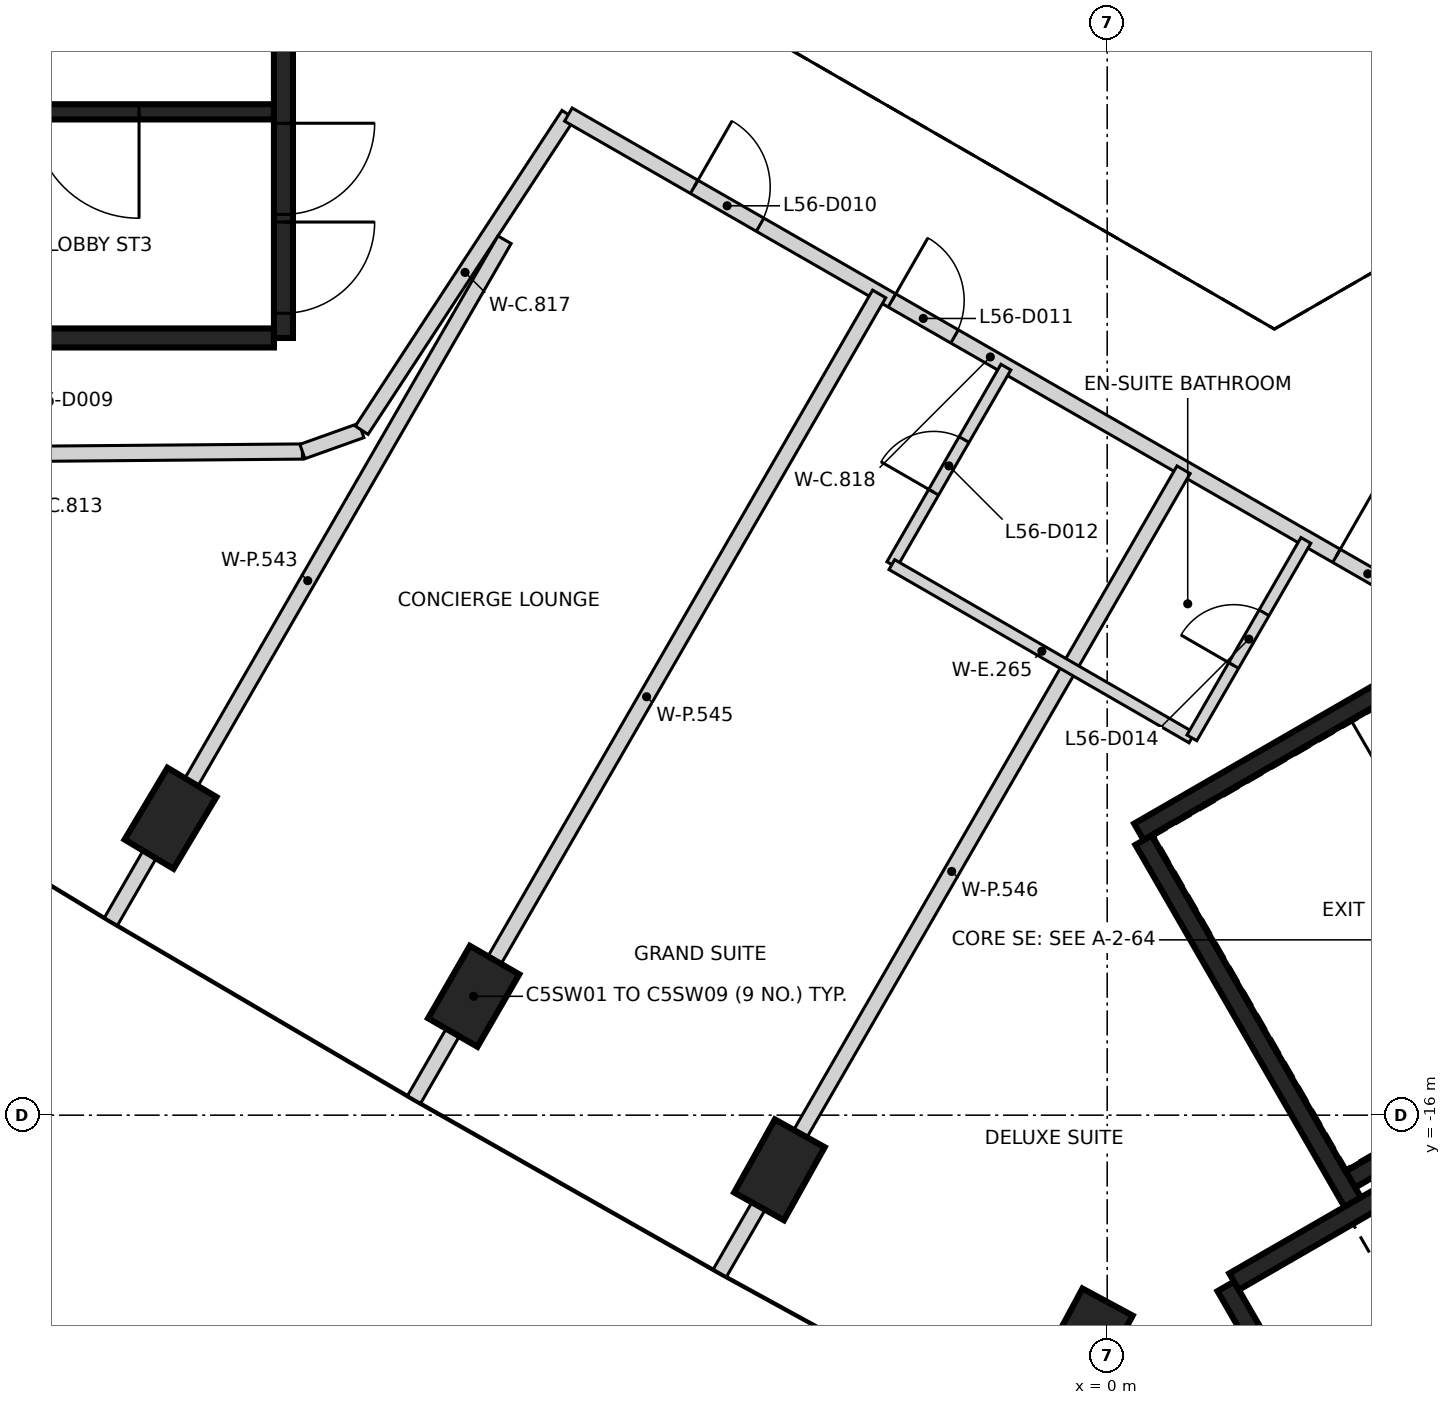
"""IFC4 building model, lengths in metres.
Left out: names, types, materials, properties, quantities, classifications, styles, units other than length and angle.
Written with IfcOpenShell. Run it as: python <this file> out.ifc"""

import sys

from ifc_helpers import new_model, si_unit, direction, frame, frame_2d, origin, origin_2d, place, context, subcontext, project, spatial, rectangle, extrude, element, fill, save


model = new_model("IFC4")
c1 = context("Model", 3, precision=1e-05, world=origin(), true_north=direction((0.0, 1.0)))
c2 = subcontext(c1, "Body", "Model", "MODEL_VIEW")
j1 = project(units=[si_unit("LENGTHUNIT", "METRE"), si_unit("PLANEANGLEUNIT", "RADIAN")], contexts=[c1])
p1 = place(None, origin())
s1 = spatial("IfcSite", under=j1, at=p1, CompositionType="ELEMENT")
p2 = place(p1, origin())
s2 = spatial("IfcBuilding", under=s1, at=p2, CompositionType="ELEMENT")
p3 = place(p2, frame((0.0, 0.0, 225.0)))
s3 = spatial("IfcBuildingStorey", under=s2, at=p3, CompositionType="ELEMENT", Elevation=225.0)
for number, where, z_axis, x_axis in (
    (1, (-12.323, -12.094, -0.35), (0.0, 0.0, 1.0), (0.513, 0.858, 0.0)),
    (2, (-8.335, -14.436, -0.35), (0.0, 0.0, 1.0), (0.5, 0.866, 0.0)),
    (3, (-4.312, -16.719, -0.35), (0.0, 0.0, 1.0), (0.487, 0.873, 0.0)),
    (4, (-0.256, -18.943, -0.35), (0.0, 0.0, 1.0), (0.475, 0.88, 0.0)),
):
    element("IfcColumn", number, at=place(p3, frame(where, z_axis=z_axis, x_axis=x_axis)), inside=s3, PredefinedType="COLUMN", context=c2, shape_type="SweptSolid", body=[
        extrude(rectangle(XDim=1.1, YDim=0.75, at=origin_2d()), origin(), (0.0, 0.0, 1.0), 3.6),
    ])
p4 = place(p3, frame((-10.837, 5.775, 0.0), z_axis=(0.0, 0.0, 1.0), x_axis=(0.0, -1.0, 0.0)))
e5 = element("IfcWall", 5, at=p4, inside=s3, PredefinedType="SHEAR", context=c2, shape_type="SweptSolid", body=[
    extrude(rectangle(XDim=11.55, YDim=0.25, at=frame_2d((5.775, 0.0))), origin(), (0.0, 0.0, 1.0), 3.25),
])
p5 = place(p4, frame((10.025, 0.0, 0.0)))
e6 = element("IfcOpeningElement", 6, at=p5, cuts=e5, PredefinedType="OPENING", context=c2, shape_type="SweptSolid", body=[
    extrude(rectangle(XDim=1.2, YDim=2.1, at=frame_2d((0.6, 1.05))), frame((0.0, 0.135, 0.0), z_axis=(0.0, -1.0, 0.0), x_axis=(1.0, 0.0, 0.0)), (0.0, 0.0, 1.0), 0.27),
])
p6 = place(p4, frame((8.725, 0.0, 0.0)))
e7 = element("IfcOpeningElement", 7, at=p6, cuts=e5, PredefinedType="OPENING", context=c2, shape_type="SweptSolid", body=[
    extrude(rectangle(XDim=1.2, YDim=2.1, at=frame_2d((0.6, 1.05))), frame((0.0, 0.135, 0.0), z_axis=(0.0, -1.0, 0.0), x_axis=(1.0, 0.0, 0.0)), (0.0, 0.0, 1.0), 0.27),
])
p7 = place(p3, frame((-10.963, -5.775, 0.0), z_axis=(0.0, 0.0, 1.0), x_axis=(-1.0, 0.0, 0.0)))
e8 = element("IfcWall", 8, at=p7, inside=s3, PredefinedType="SHEAR", context=c2, shape_type="SweptSolid", body=[
    extrude(rectangle(XDim=5.225, YDim=0.25, at=frame_2d((2.612, 0.0))), origin(), (0.0, 0.0, 1.0), 3.25),
])
p8 = place(p3, frame((-10.963, -2.8, 0.0), z_axis=(0.0, 0.0, 1.0), x_axis=(-1.0, 0.0, 0.0)))
e9 = element("IfcWall", 9, at=p8, inside=s3, PredefinedType="SHEAR", context=c2, shape_type="SweptSolid", body=[
    extrude(rectangle(XDim=5.098, YDim=0.2, at=frame_2d((2.549, 0.0))), origin(), (0.0, 0.0, 1.0), 3.25),
])
p9 = place(p8, frame((1.774, 0.0, 0.0)))
e10 = element("IfcOpeningElement", 10, at=p9, cuts=e9, PredefinedType="OPENING", context=c2, shape_type="SweptSolid", body=[
    extrude(rectangle(XDim=1.4, YDim=2.1, at=frame_2d((0.7, 1.05))), frame((0.0, 0.11, 0.0), z_axis=(0.0, -1.0, 0.0), x_axis=(1.0, 0.0, 0.0)), (0.0, 0.0, 1.0), 0.22),
])
p10 = place(p3, frame((0.417, -12.273, 0.0), z_axis=(0.0, 0.0, 1.0), x_axis=(0.866021906294, 0.500006057782, 0.0)))
e11 = element("IfcWall", 11, at=p10, inside=s3, PredefinedType="SHEAR", context=c2, shape_type="SweptSolid", body=[
    extrude(rectangle(XDim=11.55, YDim=0.25, at=frame_2d((5.775, 0.0))), origin(), (0.0, 0.0, 1.0), 3.25),
])
p11 = place(p10, frame((10.025, 0.0, 0.0)))
e12 = element("IfcOpeningElement", 12, at=p11, cuts=e11, PredefinedType="OPENING", context=c2, shape_type="SweptSolid", body=[
    extrude(rectangle(XDim=1.2, YDim=2.1, at=frame_2d((0.6, 1.05))), frame((0.0, 0.135, 0.0), z_axis=(0.0, -1.0, 0.0), x_axis=(1.0, 0.0, 0.0)), (0.0, 0.0, 1.0), 0.27),
])
p12 = place(p10, frame((8.725, 0.0, 0.0)))
e13 = element("IfcOpeningElement", 13, at=p12, cuts=e11, PredefinedType="OPENING", context=c2, shape_type="SweptSolid", body=[
    extrude(rectangle(XDim=1.2, YDim=2.1, at=frame_2d((0.6, 1.05))), frame((0.0, 0.135, 0.0), z_axis=(0.0, -1.0, 0.0), x_axis=(1.0, 0.0, 0.0)), (0.0, 0.0, 1.0), 0.27),
])
p13 = place(p3, frame((3.235, -17.153, 0.0), z_axis=(0.0, 0.0, 1.0), x_axis=(-0.500008851346, 0.866020293397, 0.0)))
e14 = element("IfcWall", 14, at=p13, inside=s3, PredefinedType="SHEAR", context=c2, shape_type="SweptSolid", body=[
    extrude(rectangle(XDim=5.51, YDim=0.25, at=frame_2d((2.755, 0.0))), origin(), (0.0, 0.0, 1.0), 3.25),
])
p14 = place(p3, frame((3.217, -21.122, 0.0), z_axis=(0.0, 0.0, 1.0), x_axis=(-0.499998874531, 0.866026053573, 0.0)))
e15 = element("IfcWall", 15, at=p14, inside=s3, PredefinedType="SHEAR", context=c2, shape_type="SweptSolid", body=[
    extrude(rectangle(XDim=3.313, YDim=0.25, at=frame_2d((1.656, 0.0))), origin(), (0.0, 0.0, 1.0), 3.25),
])
p15 = place(p3, frame((1.669, -18.19, 0.0), z_axis=(0.0, 0.0, 1.0), x_axis=(0.866042235819, 0.499970844928, 0.0)))
e16 = element("IfcWall", 16, at=p15, inside=s3, PredefinedType="SHEAR", context=c2, shape_type="SweptSolid", body=[
    extrude(rectangle(XDim=2.865, YDim=0.25, at=frame_2d((1.432, 0.0))), origin(), (0.0, 0.0, 1.0), 3.25),
])
p16 = place(p3, frame((5.431, -15.556, 0.0), z_axis=(0.0, 0.0, 1.0), x_axis=(-0.866022940537, -0.500004266446, 0.0)))
e17 = element("IfcWall", 17, at=p16, inside=s3, PredefinedType="SHEAR", context=c2, shape_type="SweptSolid", body=[
    extrude(rectangle(XDim=2.575, YDim=0.25, at=frame_2d((1.287, 0.0))), origin(), (0.0, 0.0, 1.0), 3.25),
])
p17 = place(p3, frame((-19.15, -7.341, 0.0), z_axis=(0.0, 0.0, 1.0), x_axis=(0.999964623126, 0.008411450351, 0.0)))
e18 = element("IfcWall", 18, at=p17, inside=s3, PredefinedType="PARTITIONING", context=c2, shape_type="SweptSolid", body=[
    extrude(rectangle(XDim=8.562, YDim=0.2, at=frame_2d((4.281, 0.0))), origin(), (0.0, 0.0, 1.0), 3.25),
])
p18 = place(p17, frame((3.781, 0.0, 0.0)))
e19 = element("IfcOpeningElement", 19, at=p18, cuts=e18, PredefinedType="OPENING", context=c2, shape_type="SweptSolid", body=[
    extrude(rectangle(XDim=1.0, YDim=2.1, at=frame_2d((0.5, 1.05))), frame((0.0, 0.11, 0.0), z_axis=(0.0, -1.0, 0.0), x_axis=(1.0, 0.0, 0.0)), (0.0, 0.0, 1.0), 0.22),
])
p19 = place(p3, frame((-10.588, -7.269, 0.0), z_axis=(0.0, 0.0, 1.0), x_axis=(0.941741911595, 0.336336396998, 0.0)))
e20 = element("IfcWall", 20, at=p19, inside=s3, PredefinedType="PARTITIONING", context=c2, shape_type="SweptSolid", body=[
    extrude(rectangle(XDim=0.824, YDim=0.2, at=frame_2d((0.412, 0.0))), origin(), (0.0, 0.0, 1.0), 3.25),
])
p20 = place(p3, frame((-9.808, -6.989, 0.0), z_axis=(0.0, 0.0, 1.0), x_axis=(0.547746188785, 0.836644555753, 0.0)))
e21 = element("IfcWall", 21, at=p20, inside=s3, PredefinedType="PARTITIONING", context=c2, shape_type="SweptSolid", body=[
    extrude(rectangle(XDim=4.964, YDim=0.2, at=frame_2d((2.482, 0.0))), origin(), (0.0, 0.0, 1.0), 3.25),
])
p21 = place(p3, frame((-7.089, -2.836, 0.0), z_axis=(0.0, 0.0, 1.0), x_axis=(0.867106243364, -0.498123240493, 0.0)))
e22 = element("IfcWall", 22, at=p21, inside=s3, PredefinedType="PARTITIONING", context=c2, shape_type="SweptSolid", body=[
    extrude(rectangle(XDim=12.804, YDim=0.2, at=frame_2d((6.402, 0.0))), origin(), (0.0, 0.0, 1.0), 3.25),
])
p22 = place(p21, frame((1.909, 0.0, 0.0)))
e23 = element("IfcOpeningElement", 23, at=p22, cuts=e22, PredefinedType="OPENING", context=c2, shape_type="SweptSolid", body=[
    extrude(rectangle(XDim=1.0, YDim=2.1, at=frame_2d((0.5, 1.05))), frame((0.0, 0.11, 0.0), z_axis=(0.0, -1.0, 0.0), x_axis=(1.0, 0.0, 0.0)), (0.0, 0.0, 1.0), 0.22),
])
p23 = place(p21, frame((4.91, 0.0, 0.0)))
e24 = element("IfcOpeningElement", 24, at=p23, cuts=e22, PredefinedType="OPENING", context=c2, shape_type="SweptSolid", body=[
    extrude(rectangle(XDim=0.95, YDim=2.1, at=frame_2d((0.475, 1.05))), frame((0.0, 0.11, 0.0), z_axis=(0.0, -1.0, 0.0), x_axis=(1.0, 0.0, 0.0)), (0.0, 0.0, 1.0), 0.22),
])
p24 = place(p21, frame((11.654, 0.0, 0.0)))
e25 = element("IfcOpeningElement", 25, at=p24, cuts=e22, PredefinedType="OPENING", context=c2, shape_type="SweptSolid", body=[
    extrude(rectangle(XDim=0.95, YDim=2.1, at=frame_2d((0.475, 1.05))), frame((0.0, 0.11, 0.0), z_axis=(0.0, -1.0, 0.0), x_axis=(1.0, 0.0, 0.0)), (0.0, 0.0, 1.0), 0.22),
])
p25 = place(p3, frame((-13.107, -13.453, 0.0), z_axis=(0.0, 0.0, 1.0), x_axis=(0.500020349827, 0.866013654488, 0.0)))
e26 = element("IfcWall", 26, at=p25, inside=s3, PredefinedType="PARTITIONING", context=c2, shape_type="SweptSolid", body=[
    extrude(rectangle(XDim=10.357, YDim=0.2, at=frame_2d((5.179, 0.0))), origin(), (0.0, 0.0, 1.0), 3.25),
])
p26 = place(p3, frame((-9.119, -15.795, 0.0), z_axis=(0.0, 0.0, 1.0), x_axis=(0.50001601051, 0.866016159915, 0.0)))
e27 = element("IfcWall", 27, at=p26, inside=s3, PredefinedType="PARTITIONING", context=c2, shape_type="SweptSolid", body=[
    extrude(rectangle(XDim=12.238, YDim=0.2, at=frame_2d((6.119, 0.0))), origin(), (0.0, 0.0, 1.0), 3.25),
])
p27 = place(p3, frame((-5.097, -18.078, 0.0), z_axis=(0.0, 0.0, 1.0), x_axis=(0.499960272111, 0.866048339477, 0.0)))
e28 = element("IfcWall", 28, at=p27, inside=s3, PredefinedType="PARTITIONING", context=c2, shape_type="SweptSolid", body=[
    extrude(rectangle(XDim=12.204, YDim=0.2, at=frame_2d((6.102, 0.0))), origin(), (0.0, 0.0, 1.0), 3.25),
])
p28 = place(p3, frame((-2.833, -8.757, 0.0), z_axis=(0.0, 0.0, 1.0), x_axis=(0.499990139034, 0.866031096941, 0.0)))
e29 = element("IfcWall", 29, at=p28, inside=s3, PredefinedType="PARTITIONING", context=c2, shape_type="SweptSolid", body=[
    extrude(rectangle(XDim=3.0, YDim=0.15, at=frame_2d((1.5, 0.0))), origin(), (0.0, 0.0, 1.0), 3.25),
])
p29 = place(p28, frame((1.1, 0.0, 0.0)))
e30 = element("IfcOpeningElement", 30, at=p29, cuts=e29, PredefinedType="OPENING", context=c2, shape_type="SweptSolid", body=[
    extrude(rectangle(XDim=0.8, YDim=2.1, at=frame_2d((0.4, 1.05))), frame((0.0, 0.085, 0.0), z_axis=(0.0, -1.0, 0.0), x_axis=(1.0, 0.0, 0.0)), (0.0, 0.0, 1.0), 0.17),
])
p30 = place(p3, frame((-2.833, -8.757, 0.0), z_axis=(0.0, 0.0, 1.0), x_axis=(0.866002713795, -0.500039298155, 0.0)))
e31 = element("IfcWall", 31, at=p30, inside=s3, PredefinedType="PARTITIONING", context=c2, shape_type="SweptSolid", body=[
    extrude(rectangle(XDim=4.558, YDim=0.15, at=frame_2d((2.279, 0.0))), origin(), (0.0, 0.0, 1.0), 3.25),
])
p31 = place(p3, frame((1.114, -11.036, 0.0), z_axis=(0.0, 0.0, 1.0), x_axis=(0.50002537861, 0.866010750942, 0.0)))
e32 = element("IfcWall", 32, at=p31, inside=s3, PredefinedType="PARTITIONING", context=c2, shape_type="SweptSolid", body=[
    extrude(rectangle(XDim=3.0, YDim=0.15, at=frame_2d((1.5, 0.0))), origin(), (0.0, 0.0, 1.0), 3.25),
])
p32 = place(p31, frame((1.1, 0.0, 0.0)))
e33 = element("IfcOpeningElement", 33, at=p32, cuts=e32, PredefinedType="OPENING", context=c2, shape_type="SweptSolid", body=[
    extrude(rectangle(XDim=0.8, YDim=2.1, at=frame_2d((0.4, 1.05))), frame((0.0, 0.085, 0.0), z_axis=(0.0, -1.0, 0.0), x_axis=(1.0, 0.0, 0.0)), (0.0, 0.0, 1.0), 0.17),
])
p33 = place(p5, origin())
e34 = element("IfcDoor", 34, at=p33, inside=s3, OperationType="SINGLE_SWING_LEFT", PredefinedType="DOOR", context=c2, shape_type="SweptSolid", body=[
    extrude(rectangle(XDim=1.2, YDim=2.1, at=frame_2d((0.6, 1.05))), frame((0.0, 0.025, 0.0), z_axis=(0.0, -1.0, 0.0), x_axis=(1.0, 0.0, 0.0)), (0.0, 0.0, 1.0), 0.05),
])
fill(e6, e34)
p34 = place(p6, origin())
e35 = element("IfcDoor", 35, at=p34, inside=s3, OperationType="SINGLE_SWING_RIGHT", PredefinedType="DOOR", context=c2, shape_type="SweptSolid", body=[
    extrude(rectangle(XDim=1.2, YDim=2.1, at=frame_2d((0.6, 1.05))), frame((0.0, 0.025, 0.0), z_axis=(0.0, -1.0, 0.0), x_axis=(1.0, 0.0, 0.0)), (0.0, 0.0, 1.0), 0.05),
])
fill(e7, e35)
p35 = place(p9, origin())
e36 = element("IfcDoor", 36, at=p35, inside=s3, OperationType="SINGLE_SWING_RIGHT", PredefinedType="DOOR", context=c2, shape_type="SweptSolid", body=[
    extrude(rectangle(XDim=1.4, YDim=2.1, at=frame_2d((0.7, 1.05))), frame((0.0, 0.025, 0.0), z_axis=(0.0, -1.0, 0.0), x_axis=(1.0, 0.0, 0.0)), (0.0, 0.0, 1.0), 0.05),
])
fill(e10, e36)
p36 = place(p22, frame((1.0, 0.0, 0.0), z_axis=(0.0, 0.0, 1.0), x_axis=(-1.0, 0.0, 0.0)))
e37 = element("IfcDoor", 37, at=p36, inside=s3, OperationType="SINGLE_SWING_LEFT", PredefinedType="DOOR", context=c2, shape_type="SweptSolid", body=[
    extrude(rectangle(XDim=1.0, YDim=2.1, at=frame_2d((0.5, 1.05))), frame((0.0, 0.025, 0.0), z_axis=(0.0, -1.0, 0.0), x_axis=(1.0, 0.0, 0.0)), (0.0, 0.0, 1.0), 0.05),
])
fill(e23, e37)
p37 = place(p23, frame((0.95, 0.0, 0.0), z_axis=(0.0, 0.0, 1.0), x_axis=(-1.0, 0.0, 0.0)))
e38 = element("IfcDoor", 38, at=p37, inside=s3, OperationType="SINGLE_SWING_LEFT", PredefinedType="DOOR", context=c2, shape_type="SweptSolid", body=[
    extrude(rectangle(XDim=0.95, YDim=2.1, at=frame_2d((0.475, 1.05))), frame((0.0, 0.025, 0.0), z_axis=(0.0, -1.0, 0.0), x_axis=(1.0, 0.0, 0.0)), (0.0, 0.0, 1.0), 0.05),
])
fill(e24, e38)
p38 = place(p29, frame((0.8, 0.0, 0.0), z_axis=(0.0, 0.0, 1.0), x_axis=(-1.0, 0.0, 0.0)))
e39 = element("IfcDoor", 39, at=p38, inside=s3, OperationType="SINGLE_SWING_LEFT", PredefinedType="DOOR", context=c2, shape_type="SweptSolid", body=[
    extrude(rectangle(XDim=0.8, YDim=2.1, at=frame_2d((0.4, 1.05))), frame((0.0, 0.025, 0.0), z_axis=(0.0, -1.0, 0.0), x_axis=(1.0, 0.0, 0.0)), (0.0, 0.0, 1.0), 0.05),
])
fill(e30, e39)
p39 = place(p24, frame((0.95, 0.0, 0.0), z_axis=(0.0, 0.0, 1.0), x_axis=(-1.0, 0.0, 0.0)))
e40 = element("IfcDoor", 40, at=p39, inside=s3, OperationType="SINGLE_SWING_LEFT", PredefinedType="DOOR", context=c2, shape_type="SweptSolid", body=[
    extrude(rectangle(XDim=0.95, YDim=2.1, at=frame_2d((0.475, 1.05))), frame((0.0, 0.025, 0.0), z_axis=(0.0, -1.0, 0.0), x_axis=(1.0, 0.0, 0.0)), (0.0, 0.0, 1.0), 0.05),
])
fill(e25, e40)
p40 = place(p32, origin())
e41 = element("IfcDoor", 41, at=p40, inside=s3, OperationType="SINGLE_SWING_LEFT", PredefinedType="DOOR", context=c2, shape_type="SweptSolid", body=[
    extrude(rectangle(XDim=0.8, YDim=2.1, at=frame_2d((0.4, 1.05))), frame((0.0, 0.025, 0.0), z_axis=(0.0, -1.0, 0.0), x_axis=(1.0, 0.0, 0.0)), (0.0, 0.0, 1.0), 0.05),
])
fill(e33, e41)
save(model, sys.argv[1])
